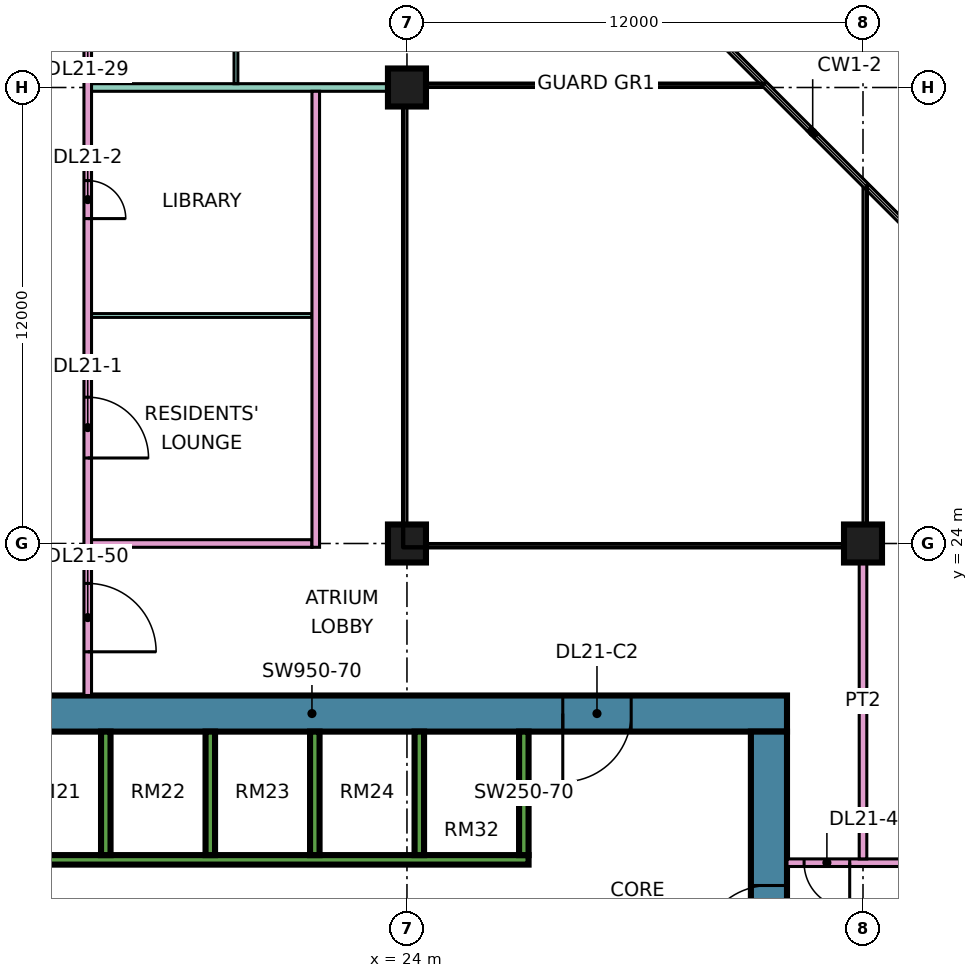
"""IFC4 building model, lengths in metres.
Left out: names, types, materials, properties, quantities, classifications, styles, units other than length and angle.
Written with IfcOpenShell. Run it as: python <this file> out.ifc"""

import sys

from ifc_helpers import new_model, si_unit, direction, frame, frame_2d, origin, origin_2d, place, context, subcontext, project, spatial, rectangle, extrude, element, fill, save


model = new_model("IFC4")
c1 = context("Model", 3, precision=1e-05, world=origin(), true_north=direction((0.0, 1.0)))
c2 = subcontext(c1, "Body", "Model", "MODEL_VIEW")
j1 = project(units=[si_unit("LENGTHUNIT", "METRE"), si_unit("PLANEANGLEUNIT", "RADIAN")], contexts=[c1])
p1 = place(None, origin())
s1 = spatial("IfcSite", under=j1, at=p1, CompositionType="ELEMENT")
p2 = place(p1, origin())
s2 = spatial("IfcBuilding", under=s1, at=p2, CompositionType="ELEMENT")
p3 = place(p2, frame((0.0, 0.0, 95.65)))
s3 = spatial("IfcBuildingStorey", under=s2, at=p3, CompositionType="ELEMENT", Elevation=95.65)
for number, where, z_axis, x_axis in (
    (1, (24.0, 24.0, 0.0), (0.0, 0.0, 1.0), (1.0, 0.0, 0.0)),
    (2, (24.0, 36.0, 0.0), (0.0, 0.0, 1.0), (1.0, 0.0, 0.0)),
    (3, (36.0, 24.0, 0.0), (0.0, 0.0, 1.0), (1.0, 0.0, 0.0)),
):
    element("IfcColumn", number, at=place(p3, frame(where, z_axis=z_axis, x_axis=x_axis)), inside=s3, PredefinedType="COLUMN", context=c2, shape_type="SweptSolid", body=[
        extrude(rectangle(XDim=1.0, YDim=1.0, at=origin_2d()), origin(), (0.0, 0.0, 1.0), 3.75),
    ])
p4 = place(p3, frame((9.0, 19.525, 0.0), z_axis=(0.0, 0.0, 1.0), x_axis=(1.0, 0.0, 0.0)))
e4 = element("IfcWall", 4, at=p4, inside=s3, PredefinedType="SHEAR", context=c2, shape_type="SweptSolid", body=[
    extrude(rectangle(XDim=25.0, YDim=0.95, at=frame_2d((12.5, 0.0))), origin(), (0.0, 0.0, 1.0), 3.75),
])
p5 = place(p4, frame((19.1, 0.0, 0.0)))
e5 = element("IfcOpeningElement", 5, at=p5, cuts=e4, PredefinedType="OPENING", context=c2, shape_type="SweptSolid", body=[
    extrude(rectangle(XDim=1.8, YDim=2.4, at=frame_2d((0.9, 1.2))), frame((0.0, 0.485, 0.0), z_axis=(0.0, -1.0, 0.0), x_axis=(1.0, 0.0, 0.0)), (0.0, 0.0, 1.0), 0.97),
])
p6 = place(p3, frame((33.525, 7.95, 0.0), z_axis=(0.0, 0.0, 1.0), x_axis=(0.0, 1.0, 0.0)))
e6 = element("IfcWall", 6, at=p6, inside=s3, PredefinedType="SHEAR", context=c2, shape_type="SweptSolid", body=[
    extrude(rectangle(XDim=11.1, YDim=0.95, at=frame_2d((5.55, 0.0))), origin(), (0.0, 0.0, 1.0), 3.75),
])
p7 = place(p6, frame((5.25, 0.0, 0.0)))
e7 = element("IfcOpeningElement", 7, at=p7, cuts=e6, PredefinedType="OPENING", context=c2, shape_type="SweptSolid", body=[
    extrude(rectangle(XDim=1.8, YDim=2.4, at=frame_2d((0.9, 1.2))), frame((0.0, 0.485, 0.0), z_axis=(0.0, -1.0, 0.0), x_axis=(1.0, 0.0, 0.0)), (0.0, 0.0, 1.0), 0.97),
])
p8 = place(p3, frame((13.45, 15.675, 0.0), z_axis=(0.0, 0.0, 1.0), x_axis=(1.0, 0.0, 0.0)))
e8 = element("IfcWall", 8, at=p8, inside=s3, PredefinedType="SHEAR", context=c2, shape_type="SweptSolid", body=[
    extrude(rectangle(XDim=13.75, YDim=0.25, at=frame_2d((6.875, 0.0))), origin(), (0.0, 0.0, 1.0), 3.75),
])
for number, where, z_axis, x_axis in (
    (9, (16.075, 15.8, 0.0), (0.0, 0.0, 1.0), (0.0, 1.0, 0.0)),
    (10, (18.825, 15.8, 0.0), (0.0, 0.0, 1.0), (0.0, 1.0, 0.0)),
    (11, (21.575, 15.8, 0.0), (0.0, 0.0, 1.0), (0.0, 1.0, 0.0)),
    (12, (24.325, 15.8, 0.0), (0.0, 0.0, 1.0), (0.0, 1.0, 0.0)),
    (13, (27.075, 15.8, 0.0), (0.0, 0.0, 1.0), (0.0, 1.0, 0.0)),
):
    element("IfcWall", number, at=place(p3, frame(where, z_axis=z_axis, x_axis=x_axis)), inside=s3, PredefinedType="SHEAR", context=c2, shape_type="SweptSolid", body=[
        extrude(rectangle(XDim=3.25, YDim=0.25, at=frame_2d((1.625, 0.0))), origin(), (0.0, 0.0, 1.0), 3.75),
    ])
p9 = place(p3, frame((15.6, 20.0, 0.0), z_axis=(0.0, 0.0, 1.0), x_axis=(0.0, 1.0, 0.0)))
e14 = element("IfcWall", 14, at=p9, inside=s3, PredefinedType="PARTITIONING", context=c2, shape_type="SweptSolid", body=[
    extrude(rectangle(XDim=27.775, YDim=0.2, at=frame_2d((13.887, 0.0))), origin(), (0.0, 0.0, 1.0), 3.35),
])
p10 = place(p9, frame((6.25, 0.0, 0.0)))
e15 = element("IfcOpeningElement", 15, at=p10, cuts=e14, PredefinedType="OPENING", context=c2, shape_type="SweptSolid", body=[
    extrude(rectangle(XDim=1.6, YDim=2.1, at=frame_2d((0.8, 1.05))), frame((0.0, 0.11, 0.0), z_axis=(0.0, -1.0, 0.0), x_axis=(1.0, 0.0, 0.0)), (0.0, 0.0, 1.0), 0.22),
])
p11 = place(p9, frame((12.55, 0.0, 0.0)))
e16 = element("IfcOpeningElement", 16, at=p11, cuts=e14, PredefinedType="OPENING", context=c2, shape_type="SweptSolid", body=[
    extrude(rectangle(XDim=1.0, YDim=2.1, at=frame_2d((0.5, 1.05))), frame((0.0, 0.11, 0.0), z_axis=(0.0, -1.0, 0.0), x_axis=(1.0, 0.0, 0.0)), (0.0, 0.0, 1.0), 0.22),
])
p12 = place(p9, frame((17.05, 0.0, 0.0)))
e17 = element("IfcOpeningElement", 17, at=p12, cuts=e14, PredefinedType="OPENING", context=c2, shape_type="SweptSolid", body=[
    extrude(rectangle(XDim=1.0, YDim=2.1, at=frame_2d((0.5, 1.05))), frame((0.0, 0.11, 0.0), z_axis=(0.0, -1.0, 0.0), x_axis=(1.0, 0.0, 0.0)), (0.0, 0.0, 1.0), 0.22),
])
p13 = place(p9, frame((1.15, 0.0, 0.0)))
e18 = element("IfcOpeningElement", 18, at=p13, cuts=e14, PredefinedType="OPENING", context=c2, shape_type="SweptSolid", body=[
    extrude(rectangle(XDim=1.8, YDim=2.1, at=frame_2d((0.9, 1.05))), frame((0.0, 0.11, 0.0), z_axis=(0.0, -1.0, 0.0), x_axis=(1.0, 0.0, 0.0)), (0.0, 0.0, 1.0), 0.22),
])
p14 = place(p9, frame((25.9, 0.0, 0.0)))
e19 = element("IfcOpeningElement", 19, at=p14, cuts=e14, PredefinedType="OPENING", context=c2, shape_type="SweptSolid", body=[
    extrude(rectangle(XDim=1.0, YDim=2.1, at=frame_2d((0.5, 1.05))), frame((0.0, 0.11, 0.0), z_axis=(0.0, -1.0, 0.0), x_axis=(1.0, 0.0, 0.0)), (0.0, 0.0, 1.0), 0.22),
])
p15 = place(p3, frame((15.7, 24.0, 0.0), z_axis=(0.0, 0.0, 1.0), x_axis=(1.0, 0.0, 0.0)))
e20 = element("IfcWall", 20, at=p15, inside=s3, PredefinedType="PARTITIONING", context=c2, shape_type="SweptSolid", body=[
    extrude(rectangle(XDim=5.8, YDim=0.2, at=frame_2d((2.9, 0.0))), origin(), (0.0, 0.0, 1.0), 3.35),
])
p16 = place(p3, frame((15.7, 30.0, 0.0), z_axis=(0.0, 0.0, 1.0), x_axis=(1.0, 0.0, 0.0)))
e21 = element("IfcWall", 21, at=p16, inside=s3, PredefinedType="PARTITIONING", context=c2, shape_type="SweptSolid", body=[
    extrude(rectangle(XDim=5.8, YDim=0.1, at=frame_2d((2.9, 0.0))), origin(), (0.0, 0.0, 1.0), 3.35),
])
p17 = place(p3, frame((15.7, 36.0, 0.0), z_axis=(0.0, 0.0, 1.0), x_axis=(1.0, 0.0, 0.0)))
e22 = element("IfcWall", 22, at=p17, inside=s3, PredefinedType="PARTITIONING", context=c2, shape_type="SweptSolid", body=[
    extrude(rectangle(XDim=8.3, YDim=0.2, at=frame_2d((4.15, 0.0))), origin(), (0.0, 0.0, 1.0), 3.35),
])
p18 = place(p3, frame((19.5, 36.1, 0.0), z_axis=(0.0, 0.0, 1.0), x_axis=(0.0, 1.0, 0.0)))
e23 = element("IfcWall", 23, at=p18, inside=s3, PredefinedType="PARTITIONING", context=c2, shape_type="SweptSolid", body=[
    extrude(rectangle(XDim=2.85, YDim=0.1, at=frame_2d((1.425, 0.0))), origin(), (0.0, 0.0, 1.0), 3.35),
])
p19 = place(p18, frame((0.95, 0.0, 0.0)))
e24 = element("IfcOpeningElement", 24, at=p19, cuts=e23, PredefinedType="OPENING", context=c2, shape_type="SweptSolid", body=[
    extrude(rectangle(XDim=0.9, YDim=2.1, at=frame_2d((0.45, 1.05))), frame((0.0, 0.06, 0.0), z_axis=(0.0, -1.0, 0.0), x_axis=(1.0, 0.0, 0.0)), (0.0, 0.0, 1.0), 0.12),
])
p20 = place(p3, frame((21.6, 23.9, 0.0), z_axis=(0.0, 0.0, 1.0), x_axis=(0.0, 1.0, 0.0)))
e25 = element("IfcWall", 25, at=p20, inside=s3, PredefinedType="PARTITIONING", context=c2, shape_type="SweptSolid", body=[
    extrude(rectangle(XDim=12.0, YDim=0.2, at=frame_2d((6.0, 0.0))), origin(), (0.0, 0.0, 1.0), 3.35),
])
p21 = place(p3, frame((34.0, 15.6, 0.0), z_axis=(0.0, 0.0, 1.0), x_axis=(1.0, 0.0, 0.0)))
e26 = element("IfcWall", 26, at=p21, inside=s3, PredefinedType="PARTITIONING", context=c2, shape_type="SweptSolid", body=[
    extrude(rectangle(XDim=10.35, YDim=0.2, at=frame_2d((5.175, 0.0))), origin(), (0.0, 0.0, 1.0), 3.35),
])
p22 = place(p21, frame((5.6, 0.0, 0.0)))
e27 = element("IfcOpeningElement", 27, at=p22, cuts=e26, PredefinedType="OPENING", context=c2, shape_type="SweptSolid", body=[
    extrude(rectangle(XDim=1.0, YDim=2.1, at=frame_2d((0.5, 1.05))), frame((0.0, 0.11, 0.0), z_axis=(0.0, -1.0, 0.0), x_axis=(1.0, 0.0, 0.0)), (0.0, 0.0, 1.0), 0.22),
])
p23 = place(p21, frame((0.45, 0.0, 0.0)))
e28 = element("IfcOpeningElement", 28, at=p23, cuts=e26, PredefinedType="OPENING", context=c2, shape_type="SweptSolid", body=[
    extrude(rectangle(XDim=1.2, YDim=2.1, at=frame_2d((0.6, 1.05))), frame((0.0, 0.11, 0.0), z_axis=(0.0, -1.0, 0.0), x_axis=(1.0, 0.0, 0.0)), (0.0, 0.0, 1.0), 0.22),
])
p24 = place(p3, frame((36.0, 15.7, 0.0), z_axis=(0.0, 0.0, 1.0), x_axis=(0.0, 1.0, 0.0)))
e29 = element("IfcWall", 29, at=p24, inside=s3, PredefinedType="PARTITIONING", context=c2, shape_type="SweptSolid", body=[
    extrude(rectangle(XDim=8.3, YDim=0.2, at=frame_2d((4.15, 0.0))), origin(), (0.0, 0.0, 1.0), 3.35),
])
p25 = place(p7, origin())
e30 = element("IfcDoor", 30, at=p25, inside=s3, OperationType="DOUBLE_DOOR_SINGLE_SWING", PredefinedType="DOOR", context=c2, shape_type="SweptSolid", body=[
    extrude(rectangle(XDim=1.8, YDim=2.4, at=frame_2d((0.9, 1.2))), frame((0.0, 0.025, 0.0), z_axis=(0.0, -1.0, 0.0), x_axis=(1.0, 0.0, 0.0)), (0.0, 0.0, 1.0), 0.05),
])
fill(e7, e30)
p26 = place(p5, frame((1.8, 0.0, 0.0), z_axis=(0.0, 0.0, 1.0), x_axis=(-1.0, 0.0, 0.0)))
e31 = element("IfcDoor", 31, at=p26, inside=s3, OperationType="DOUBLE_DOOR_SINGLE_SWING", PredefinedType="DOOR", context=c2, shape_type="SweptSolid", body=[
    extrude(rectangle(XDim=1.8, YDim=2.4, at=frame_2d((0.9, 1.2))), frame((0.0, 0.025, 0.0), z_axis=(0.0, -1.0, 0.0), x_axis=(1.0, 0.0, 0.0)), (0.0, 0.0, 1.0), 0.05),
])
fill(e5, e31)
p27 = place(p10, frame((1.6, 0.0, 0.0), z_axis=(0.0, 0.0, 1.0), x_axis=(-1.0, 0.0, 0.0)))
e32 = element("IfcDoor", 32, at=p27, inside=s3, OperationType="DOUBLE_DOOR_SINGLE_SWING", PredefinedType="DOOR", context=c2, shape_type="SweptSolid", body=[
    extrude(rectangle(XDim=1.6, YDim=2.1, at=frame_2d((0.8, 1.05))), frame((0.0, 0.025, 0.0), z_axis=(0.0, -1.0, 0.0), x_axis=(1.0, 0.0, 0.0)), (0.0, 0.0, 1.0), 0.05),
])
fill(e15, e32)
p28 = place(p11, frame((1.0, 0.0, 0.0), z_axis=(0.0, 0.0, 1.0), x_axis=(-1.0, 0.0, 0.0)))
e33 = element("IfcDoor", 33, at=p28, inside=s3, OperationType="SINGLE_SWING_LEFT", PredefinedType="DOOR", context=c2, shape_type="SweptSolid", body=[
    extrude(rectangle(XDim=1.0, YDim=2.1, at=frame_2d((0.5, 1.05))), frame((0.0, 0.025, 0.0), z_axis=(0.0, -1.0, 0.0), x_axis=(1.0, 0.0, 0.0)), (0.0, 0.0, 1.0), 0.05),
])
fill(e16, e33)
p29 = place(p23, origin())
e34 = element("IfcDoor", 34, at=p29, inside=s3, OperationType="SINGLE_SWING_RIGHT", PredefinedType="DOOR", context=c2, shape_type="SweptSolid", body=[
    extrude(rectangle(XDim=1.2, YDim=2.1, at=frame_2d((0.6, 1.05))), frame((0.0, 0.025, 0.0), z_axis=(0.0, -1.0, 0.0), x_axis=(1.0, 0.0, 0.0)), (0.0, 0.0, 1.0), 0.05),
])
fill(e28, e34)
p30 = place(p13, frame((1.8, 0.0, 0.0), z_axis=(0.0, 0.0, 1.0), x_axis=(-1.0, 0.0, 0.0)))
e35 = element("IfcDoor", 35, at=p30, inside=s3, OperationType="DOUBLE_DOOR_SINGLE_SWING", PredefinedType="DOOR", context=c2, shape_type="SweptSolid", body=[
    extrude(rectangle(XDim=1.8, YDim=2.1, at=frame_2d((0.9, 1.05))), frame((0.0, 0.025, 0.0), z_axis=(0.0, -1.0, 0.0), x_axis=(1.0, 0.0, 0.0)), (0.0, 0.0, 1.0), 0.05),
])
fill(e18, e35)
save(model, sys.argv[1])
